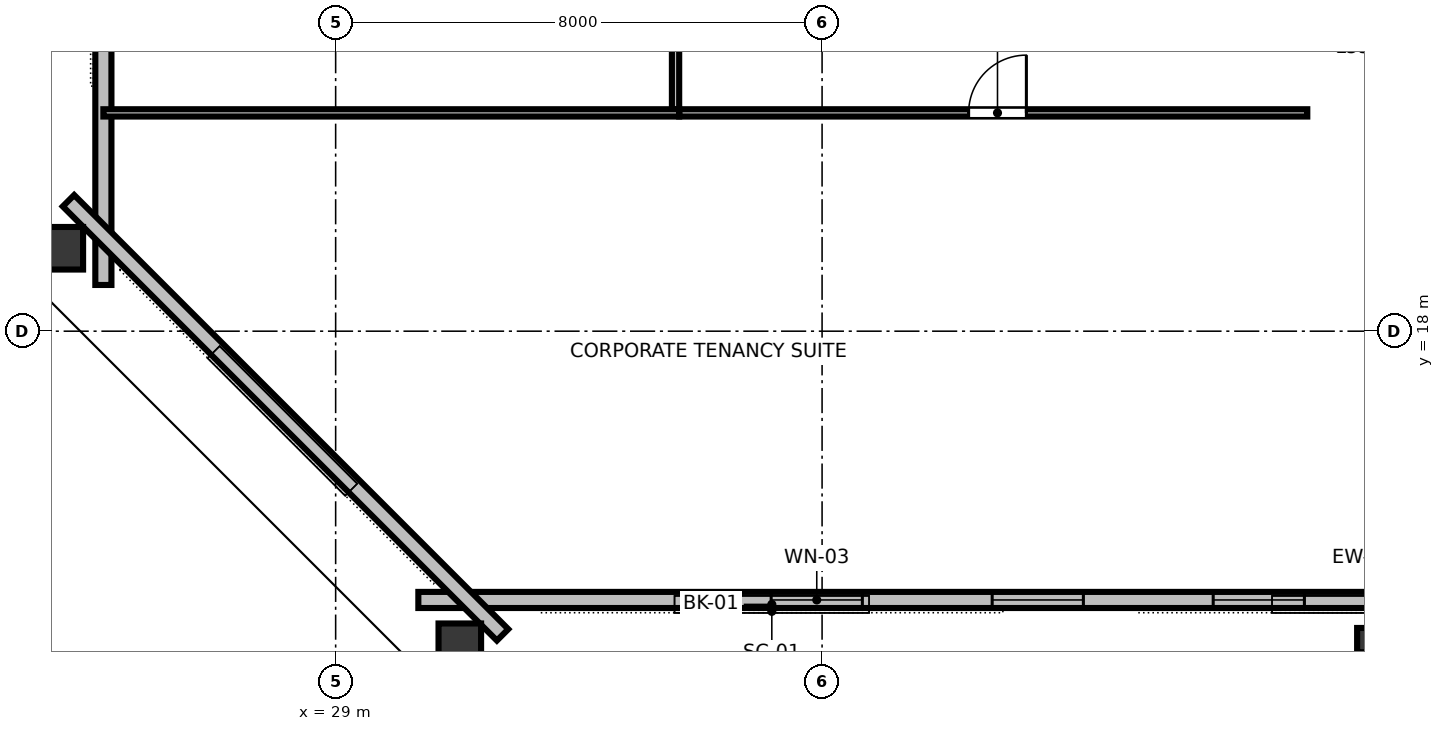
"""IFC4 building model, lengths in metres.
Left out: names, types, materials, properties, quantities, classifications, styles, units other than length and angle.
Written with IfcOpenShell. Run it as: python <this file> out.ifc"""

import sys

from ifc_helpers import new_model, si_unit, direction, frame, frame_2d, origin, origin_2d, place, context, subcontext, project, spatial, rectangle, hollow_rectangle, i_section, extrude, element, fill, save


model = new_model("IFC4")
c1 = context("Model", 3, precision=1e-05, world=origin(), true_north=direction((0.0, 1.0)))
c2 = subcontext(c1, "Body", "Model", "MODEL_VIEW")
j1 = project(units=[si_unit("LENGTHUNIT", "METRE"), si_unit("PLANEANGLEUNIT", "RADIAN")], contexts=[c1])
p1 = place(None, origin())
s1 = spatial("IfcSite", under=j1, at=p1, CompositionType="ELEMENT")
p2 = place(p1, origin())
s2 = spatial("IfcBuilding", under=s1, at=p2, CompositionType="ELEMENT")
p3 = place(p2, frame((0.0, 0.0, 202.2)))
s3 = spatial("IfcBuildingStorey", under=s2, at=p3, CompositionType="ELEMENT", Elevation=202.2)
p4 = place(p3, frame((31.042, 12.768, 0.0), z_axis=(0.0, 0.0, 1.0), x_axis=(1.0, 0.0, 0.0)))
e1 = element("IfcColumn", 1, at=p4, inside=s3, PredefinedType="COLUMN", context=c2, shape_type="SweptSolid", body=[
    extrude(hollow_rectangle(XDim=0.7, YDim=0.85, WallThickness=0.04, at=origin_2d()), origin(), (0.0, 0.0, 1.0), 3.373),
])
p5 = place(p3, frame((46.0, 12.92, 0.0), z_axis=(0.0, 0.0, 1.0), x_axis=(1.0, 0.0, 0.0)))
e2 = element("IfcColumn", 2, at=p5, inside=s3, PredefinedType="COLUMN", context=c2, shape_type="SweptSolid", body=[
    extrude(i_section(OverallWidth=0.401, OverallDepth=0.399, WebThickness=0.025, FlangeThickness=0.04, FilletRadius=0.025, at=origin_2d()), origin(), (0.0, 0.0, 1.0), 3.373),
])
p6 = place(p3, frame((24.421, 19.364, 0.0), z_axis=(0.0, 0.0, 1.0), x_axis=(0.0, 1.0, 0.0)))
e3 = element("IfcColumn", 3, at=p6, inside=s3, PredefinedType="COLUMN", context=c2, shape_type="SweptSolid", body=[
    extrude(hollow_rectangle(XDim=0.7, YDim=0.85, WallThickness=0.04, at=origin_2d()), origin(), (0.0, 0.0, 1.0), 3.373),
])
p7 = place(p3, frame((30.36, 13.58, 0.0), z_axis=(0.0, 0.0, 1.0), x_axis=(1.0, 0.0, 0.0)))
e4 = element("IfcWall", 4, at=p7, inside=s3, PredefinedType="STANDARD", context=c2, shape_type="SweptSolid", body=[
    extrude(rectangle(XDim=31.28, YDim=0.265, at=frame_2d((15.64, 0.0))), origin(), (0.0, 0.0, 1.0), 3.375),
])
p8 = place(p7, frame((5.802, 0.0, 0.85)))
e5 = element("IfcOpeningElement", 5, at=p8, cuts=e4, PredefinedType="OPENING", context=c2, shape_type="SweptSolid", body=[
    extrude(rectangle(XDim=1.5, YDim=1.85, at=frame_2d((0.75, 0.925))), frame((0.0, 0.142, 0.0), z_axis=(0.0, -1.0, 0.0), x_axis=(1.0, 0.0, 0.0)), (0.0, 0.0, 1.0), 0.285),
])
p9 = place(p7, frame((9.438, 0.0, 0.85)))
e6 = element("IfcOpeningElement", 6, at=p9, cuts=e4, PredefinedType="OPENING", context=c2, shape_type="SweptSolid", body=[
    extrude(rectangle(XDim=1.5, YDim=1.85, at=frame_2d((0.75, 0.925))), frame((0.0, 0.142, 0.0), z_axis=(0.0, -1.0, 0.0), x_axis=(1.0, 0.0, 0.0)), (0.0, 0.0, 1.0), 0.285),
])
p10 = place(p7, frame((13.073, 0.0, 0.85)))
e7 = element("IfcOpeningElement", 7, at=p10, cuts=e4, PredefinedType="OPENING", context=c2, shape_type="SweptSolid", body=[
    extrude(rectangle(XDim=1.5, YDim=1.85, at=frame_2d((0.75, 0.925))), frame((0.0, 0.142, 0.0), z_axis=(0.0, -1.0, 0.0), x_axis=(1.0, 0.0, 0.0)), (0.0, 0.0, 1.0), 0.285),
])
p11 = place(p7, frame((16.708, 0.0, 0.85)))
e8 = element("IfcOpeningElement", 8, at=p11, cuts=e4, PredefinedType="OPENING", context=c2, shape_type="SweptSolid", body=[
    extrude(rectangle(XDim=1.5, YDim=1.85, at=frame_2d((0.75, 0.925))), frame((0.0, 0.142, 0.0), z_axis=(0.0, -1.0, 0.0), x_axis=(1.0, 0.0, 0.0)), (0.0, 0.0, 1.0), 0.285),
])
p12 = place(p7, frame((20.343, 0.0, 0.85)))
e9 = element("IfcOpeningElement", 9, at=p12, cuts=e4, PredefinedType="OPENING", context=c2, shape_type="SweptSolid", body=[
    extrude(rectangle(XDim=1.5, YDim=1.85, at=frame_2d((0.75, 0.925))), frame((0.0, 0.142, 0.0), z_axis=(0.0, -1.0, 0.0), x_axis=(1.0, 0.0, 0.0)), (0.0, 0.0, 1.0), 0.285),
])
p13 = place(p7, frame((23.978, 0.0, 0.85)))
e10 = element("IfcOpeningElement", 10, at=p13, cuts=e4, PredefinedType="OPENING", context=c2, shape_type="SweptSolid", body=[
    extrude(rectangle(XDim=1.5, YDim=1.85, at=frame_2d((0.75, 0.925))), frame((0.0, 0.142, 0.0), z_axis=(0.0, -1.0, 0.0), x_axis=(1.0, 0.0, 0.0)), (0.0, 0.0, 1.0), 0.285),
])
p14 = place(p3, frame((25.18, 45.24, 0.0), z_axis=(0.0, 0.0, 1.0), x_axis=(0.0, -1.0, 0.0)))
e11 = element("IfcWall", 11, at=p14, inside=s3, PredefinedType="STANDARD", context=c2, shape_type="SweptSolid", body=[
    extrude(rectangle(XDim=26.48, YDim=0.265, at=frame_2d((13.24, 0.0))), origin(), (0.0, 0.0, 1.0), 3.375),
])
p15 = place(p14, frame((6.42, 0.0, 0.85)))
e12 = element("IfcOpeningElement", 12, at=p15, cuts=e11, PredefinedType="OPENING", context=c2, shape_type="SweptSolid", body=[
    extrude(rectangle(XDim=1.5, YDim=1.85, at=frame_2d((0.75, 0.925))), frame((0.0, 0.142, 0.0), z_axis=(0.0, -1.0, 0.0), x_axis=(1.0, 0.0, 0.0)), (0.0, 0.0, 1.0), 0.285),
])
p16 = place(p14, frame((14.513, 0.0, 0.85)))
e13 = element("IfcOpeningElement", 13, at=p16, cuts=e11, PredefinedType="OPENING", context=c2, shape_type="SweptSolid", body=[
    extrude(rectangle(XDim=1.5, YDim=1.85, at=frame_2d((0.75, 0.925))), frame((0.0, 0.142, 0.0), z_axis=(0.0, -1.0, 0.0), x_axis=(1.0, 0.0, 0.0)), (0.0, 0.0, 1.0), 0.285),
])
p17 = place(p14, frame((18.56, 0.0, 0.85)))
e14 = element("IfcOpeningElement", 14, at=p17, cuts=e11, PredefinedType="OPENING", context=c2, shape_type="SweptSolid", body=[
    extrude(rectangle(XDim=1.5, YDim=1.85, at=frame_2d((0.75, 0.925))), frame((0.0, 0.142, 0.0), z_axis=(0.0, -1.0, 0.0), x_axis=(1.0, 0.0, 0.0)), (0.0, 0.0, 1.0), 0.285),
])
p18 = place(p3, frame((24.606, 20.146, 0.0), z_axis=(0.0, 0.0, 1.0), x_axis=(0.707106781187, -0.707106781187, 0.0)))
e15 = element("IfcWall", 15, at=p18, inside=s3, PredefinedType="STANDARD", context=c2, shape_type="SweptSolid", body=[
    extrude(rectangle(XDim=10.097, YDim=0.265, at=frame_2d((5.048, 0.0))), origin(), (0.0, 0.0, 1.0), 3.375),
])
p19 = place(p3, frame((34.65, 21.59, 0.0), z_axis=(0.0, 0.0, 1.0), x_axis=(1.0, 0.0, 0.0)))
e16 = element("IfcWall", 16, at=p19, inside=s3, PredefinedType="PARTITIONING", context=c2, shape_type="SweptSolid", body=[
    extrude(rectangle(XDim=10.33, YDim=0.12, at=frame_2d((5.165, 0.0))), origin(), (0.0, 0.0, 1.0), 2.655),
])
p20 = place(p19, frame((4.76, 0.0, 0.0)))
e17 = element("IfcOpeningElement", 17, at=p20, cuts=e16, PredefinedType="OPENING", context=c2, shape_type="SweptSolid", body=[
    extrude(rectangle(XDim=0.95, YDim=2.15, at=frame_2d((0.475, 1.075))), frame((0.0, 0.07, 0.0), z_axis=(0.0, -1.0, 0.0), x_axis=(1.0, 0.0, 0.0)), (0.0, 0.0, 1.0), 0.14),
])
p21 = place(p3, frame((34.59, 21.65, 0.0), z_axis=(0.0, 0.0, 1.0), x_axis=(0.0, 1.0, 0.0)))
e18 = element("IfcWall", 18, at=p21, inside=s3, PredefinedType="PARTITIONING", context=c2, shape_type="SweptSolid", body=[
    extrude(rectangle(XDim=20.7, YDim=0.12, at=frame_2d((10.35, 0.0))), origin(), (0.0, 0.0, 1.0), 2.655),
])
p22 = place(p21, frame((2.698, 0.0, 0.0)))
e19 = element("IfcOpeningElement", 19, at=p22, cuts=e18, PredefinedType="OPENING", context=c2, shape_type="SweptSolid", body=[
    extrude(rectangle(XDim=0.95, YDim=2.15, at=frame_2d((0.475, 1.075))), frame((0.0, 0.07, 0.0), z_axis=(0.0, -1.0, 0.0), x_axis=(1.0, 0.0, 0.0)), (0.0, 0.0, 1.0), 0.14),
])
p23 = place(p21, frame((8.556, 0.0, 0.0)))
e20 = element("IfcOpeningElement", 20, at=p23, cuts=e18, PredefinedType="OPENING", context=c2, shape_type="SweptSolid", body=[
    extrude(rectangle(XDim=0.95, YDim=2.15, at=frame_2d((0.475, 1.075))), frame((0.0, 0.07, 0.0), z_axis=(0.0, -1.0, 0.0), x_axis=(1.0, 0.0, 0.0)), (0.0, 0.0, 1.0), 0.14),
])
p24 = place(p21, frame((15.733, 0.0, 0.0)))
e21 = element("IfcOpeningElement", 21, at=p24, cuts=e18, PredefinedType="OPENING", context=c2, shape_type="SweptSolid", body=[
    extrude(rectangle(XDim=0.95, YDim=2.15, at=frame_2d((0.475, 1.075))), frame((0.0, 0.07, 0.0), z_axis=(0.0, -1.0, 0.0), x_axis=(1.0, 0.0, 0.0)), (0.0, 0.0, 1.0), 0.14),
])
p25 = place(p3, frame((34.65, 21.59, 0.0), z_axis=(0.0, 0.0, 1.0), x_axis=(-1.0, 0.0, 0.0)))
e22 = element("IfcWall", 22, at=p25, inside=s3, PredefinedType="PARTITIONING", context=c2, shape_type="SweptSolid", body=[
    extrude(rectangle(XDim=9.47, YDim=0.12, at=frame_2d((4.735, 0.0))), origin(), (0.0, 0.0, 1.0), 2.655),
])
p26 = place(p8, origin())
e23 = element("IfcWindow", 23, at=p26, inside=s3, PartitioningType="SINGLE_PANEL", PredefinedType="WINDOW", context=c2, shape_type="SweptSolid", body=[
    extrude(rectangle(XDim=1.5, YDim=1.85, at=frame_2d((0.75, 0.925))), frame((0.0, 0.03, 0.0), z_axis=(0.0, -1.0, 0.0), x_axis=(1.0, 0.0, 0.0)), (0.0, 0.0, 1.0), 0.06),
])
fill(e5, e23)
p27 = place(p9, origin())
e24 = element("IfcWindow", 24, at=p27, inside=s3, PartitioningType="SINGLE_PANEL", PredefinedType="WINDOW", context=c2, shape_type="SweptSolid", body=[
    extrude(rectangle(XDim=1.5, YDim=1.85, at=frame_2d((0.75, 0.925))), frame((0.0, 0.03, 0.0), z_axis=(0.0, -1.0, 0.0), x_axis=(1.0, 0.0, 0.0)), (0.0, 0.0, 1.0), 0.06),
])
fill(e6, e24)
p28 = place(p10, origin())
e25 = element("IfcWindow", 25, at=p28, inside=s3, PartitioningType="SINGLE_PANEL", PredefinedType="WINDOW", context=c2, shape_type="SweptSolid", body=[
    extrude(rectangle(XDim=1.5, YDim=1.85, at=frame_2d((0.75, 0.925))), frame((0.0, 0.03, 0.0), z_axis=(0.0, -1.0, 0.0), x_axis=(1.0, 0.0, 0.0)), (0.0, 0.0, 1.0), 0.06),
])
fill(e7, e25)
p29 = place(p20, origin())
e26 = element("IfcDoor", 26, at=p29, inside=s3, OperationType="SINGLE_SWING_RIGHT", PredefinedType="DOOR", context=c2, shape_type="SweptSolid", body=[
    extrude(rectangle(XDim=0.95, YDim=2.15, at=frame_2d((0.475, 1.075))), frame((0.0, 0.025, 0.0), z_axis=(0.0, -1.0, 0.0), x_axis=(1.0, 0.0, 0.0)), (0.0, 0.0, 1.0), 0.05),
])
fill(e17, e26)
save(model, sys.argv[1])
